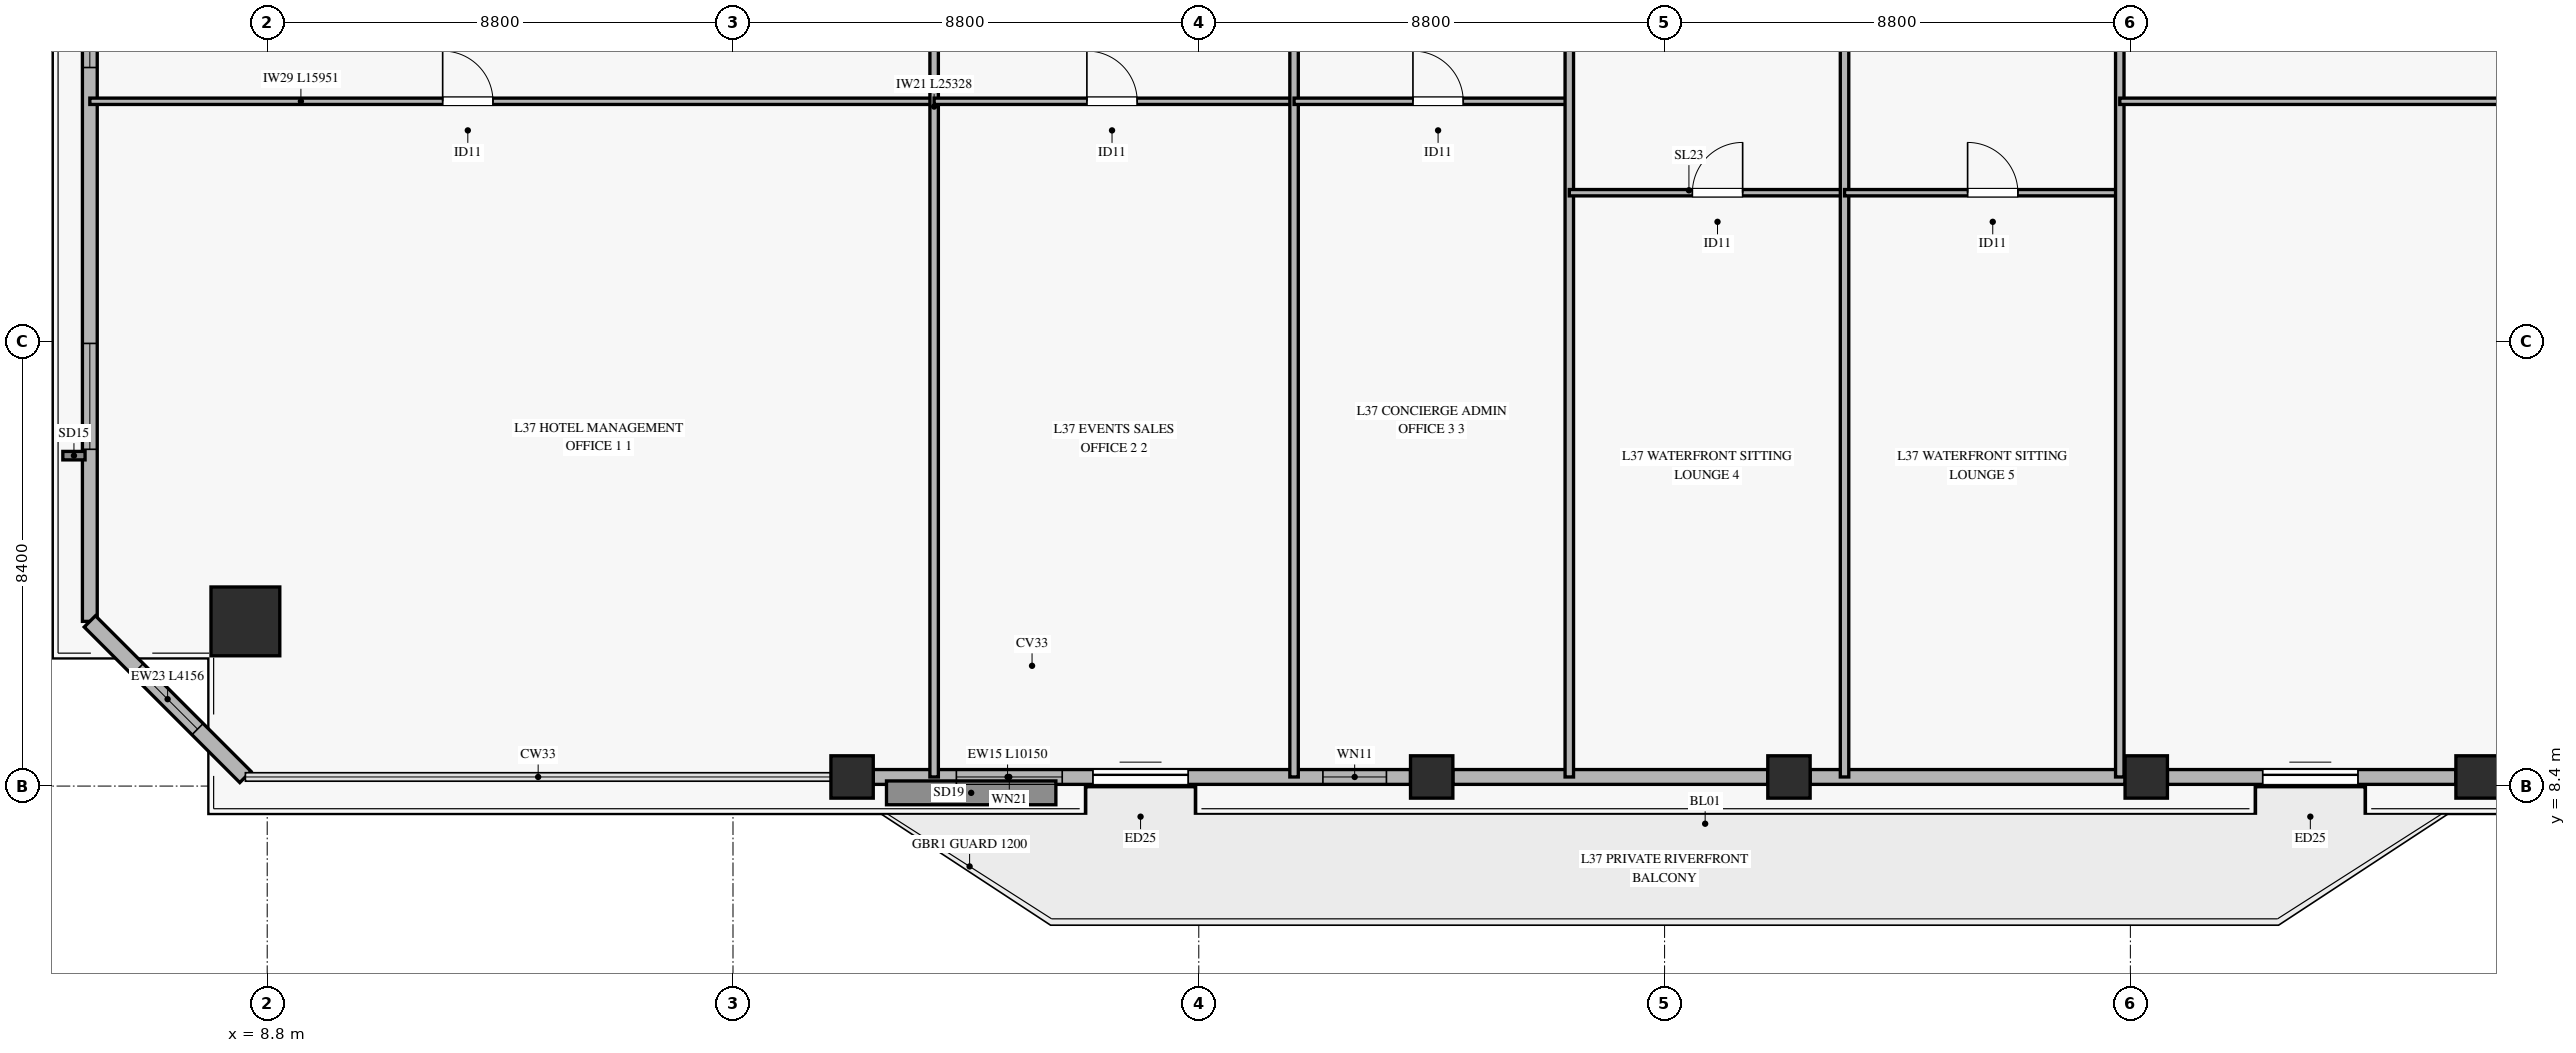
"""IFC4 building model, lengths in metres.
Left out: names, types, materials, properties, quantities, classifications, styles, units other than length and angle.
Written with IfcOpenShell. Run it as: python <this file> out.ifc"""

import sys

from ifc_helpers import new_model, si_unit, direction, frame, frame_2d, origin, origin_2d, place, context, subcontext, project, spatial, rectangle, hollow_rectangle, extrude, source, transform, mapped, element, fill, save


model = new_model("IFC4")
c1 = context("Model", 3, precision=1e-05, world=origin(), true_north=direction((0.0, 1.0)))
c2 = subcontext(c1, "Body", "Model", "MODEL_VIEW")
j1 = project(units=[si_unit("LENGTHUNIT", "METRE"), si_unit("PLANEANGLEUNIT", "RADIAN")], contexts=[c1])
p1 = place(None, origin())
s1 = spatial("IfcSite", under=j1, at=p1, CompositionType="ELEMENT")
p2 = place(p1, origin())
s2 = spatial("IfcBuilding", under=s1, at=p2, CompositionType="ELEMENT")
p3 = place(p2, frame((0.0, 0.0, 152.7)))
s3 = spatial("IfcBuildingStorey", under=s2, at=p3, CompositionType="ELEMENT", Elevation=152.7)
m1 = source(origin(), c2, "Body", "SweptSolid", [
    extrude(hollow_rectangle(XDim=1.3, YDim=1.3, WallThickness=0.06, at=origin_2d()), origin(), (0.0, 0.0, 1.0), 3.27),
])
p4 = place(p3, frame((8.388, 11.511, 0.0), z_axis=(0.0, 0.0, 1.0), x_axis=(1.0, 0.0, 0.0)))
e1 = element("IfcColumn", 1, at=p4, inside=s3, PredefinedType="COLUMN", context=c2, shape_type="MappedRepresentation", body=[
    mapped(m1, transform((0.0, 0.0, 0.0), x_axis=(1.0, 0.0, 0.0), y_axis=(0.0, 1.0, 0.0), z_axis=(0.0, 0.0, 1.0), scale=1.0)),
])
m2 = source(origin(), c2, "Body", "SweptSolid", [
    extrude(hollow_rectangle(XDim=0.8, YDim=0.8, WallThickness=0.036, at=origin_2d()), origin(), (0.0, 0.0, 1.0), 3.27),
])
for number, where, z_axis, x_axis in (
    (2, (19.85, 8.572, 0.0), (0.0, 0.0, 1.0), (1.0, 0.0, 0.0)),
    (3, (30.8, 8.572, 0.0), (0.0, 0.0, 1.0), (1.0, 0.0, 0.0)),
    (4, (37.55, 8.572, 0.0), (0.0, 0.0, 1.0), (1.0, 0.0, 0.0)),
    (5, (44.3, 8.572, 0.0), (0.0, 0.0, 1.0), (1.0, 0.0, 0.0)),
    (6, (50.55, 8.572, 0.0), (0.0, 0.0, 1.0), (1.0, 0.0, 0.0)),
):
    element("IfcColumn", number, at=place(p3, frame(where, z_axis=z_axis, x_axis=x_axis)), inside=s3, PredefinedType="COLUMN", context=c2, shape_type="MappedRepresentation", body=[
        mapped(m2, transform((0.0, 0.0, 0.0), x_axis=(1.0, 0.0, 0.0), y_axis=(0.0, 1.0, 0.0), z_axis=(0.0, 0.0, 1.0), scale=1.0)),
    ])
p5 = place(p3, frame((20.25, 8.572, 0.0), z_axis=(0.0, 0.0, 1.0), x_axis=(1.0, 0.0, 0.0)))
e7 = element("IfcWall", 7, at=p5, inside=s3, PredefinedType="SOLIDWALL", context=c2, shape_type="SweptSolid", body=[
    extrude(rectangle(XDim=10.15, YDim=0.28, at=frame_2d((5.075, 0.0))), origin(), (0.0, 0.0, 1.0), 2.75),
])
p6 = place(p5, frame((4.15, 0.0, 0.0)))
e8 = element("IfcOpeningElement", 8, at=p6, cuts=e7, PredefinedType="OPENING", context=c2, shape_type="SweptSolid", body=[
    extrude(rectangle(XDim=1.8, YDim=2.25, at=frame_2d((0.9, 1.125))), frame((0.0, 0.15, 0.0), z_axis=(0.0, -1.0, 0.0), x_axis=(1.0, 0.0, 0.0)), (0.0, 0.0, 1.0), 0.3),
])
p7 = place(p5, frame((1.57, 0.0, 0.45)))
e9 = element("IfcOpeningElement", 9, at=p7, cuts=e7, PredefinedType="OPENING", context=c2, shape_type="SweptSolid", body=[
    extrude(rectangle(XDim=2.0, YDim=2.0, at=frame_2d((1.0, 1.0))), frame((0.0, 0.15, 0.0), z_axis=(0.0, -1.0, 0.0), x_axis=(1.0, 0.0, 0.0)), (0.0, 0.0, 1.0), 0.3),
])
p8 = place(p5, frame((8.495, 0.0, 0.45)))
e10 = element("IfcOpeningElement", 10, at=p8, cuts=e7, PredefinedType="OPENING", context=c2, shape_type="SweptSolid", body=[
    extrude(rectangle(XDim=1.2, YDim=2.0, at=frame_2d((0.6, 1.0))), frame((0.0, 0.15, 0.0), z_axis=(0.0, -1.0, 0.0), x_axis=(1.0, 0.0, 0.0)), (0.0, 0.0, 1.0), 0.3),
])
for number, where, z_axis, x_axis in (
    (11, (31.2, 8.572, 0.0), (0.0, 0.0, 1.0), (1.0, 0.0, 0.0)),
    (12, (37.95, 8.572, 0.0), (0.0, 0.0, 1.0), (1.0, 0.0, 0.0)),
):
    element("IfcWall", number, at=place(p3, frame(where, z_axis=z_axis, x_axis=x_axis)), inside=s3, PredefinedType="SOLIDWALL", context=c2, shape_type="SweptSolid", body=[
        extrude(rectangle(XDim=5.95, YDim=0.28, at=frame_2d((2.975, 0.0))), origin(), (0.0, 0.0, 1.0), 2.75),
    ])
p9 = place(p3, frame((44.7, 8.572, 0.0), z_axis=(0.0, 0.0, 1.0), x_axis=(1.0, 0.0, 0.0)))
e13 = element("IfcWall", 13, at=p9, inside=s3, PredefinedType="SOLIDWALL", context=c2, shape_type="SweptSolid", body=[
    extrude(rectangle(XDim=5.45, YDim=0.28, at=frame_2d((2.725, 0.0))), origin(), (0.0, 0.0, 1.0), 2.75),
])
p10 = place(p9, frame((1.8, 0.0, 0.0)))
e14 = element("IfcOpeningElement", 14, at=p10, cuts=e13, PredefinedType="OPENING", context=c2, shape_type="SweptSolid", body=[
    extrude(rectangle(XDim=1.8, YDim=2.25, at=frame_2d((0.9, 1.125))), frame((0.0, 0.15, 0.0), z_axis=(0.0, -1.0, 0.0), x_axis=(1.0, 0.0, 0.0)), (0.0, 0.0, 1.0), 0.3),
])
p11 = place(p3, frame((5.449, 11.511, 0.0), z_axis=(0.0, 0.0, 1.0), x_axis=(0.0, 1.0, 0.0)))
e15 = element("IfcWall", 15, at=p11, inside=s3, PredefinedType="SOLIDWALL", context=c2, shape_type="SweptSolid", body=[
    extrude(rectangle(XDim=15.425, YDim=0.28, at=frame_2d((7.712, 0.0))), origin(), (0.0, 0.0, 1.0), 2.75),
])
p12 = place(p11, frame((3.251, 0.0, 0.45)))
e16 = element("IfcOpeningElement", 16, at=p12, cuts=e15, PredefinedType="OPENING", context=c2, shape_type="SweptSolid", body=[
    extrude(rectangle(XDim=2.0, YDim=2.0, at=frame_2d((1.0, 1.0))), frame((0.0, 0.15, 0.0), z_axis=(0.0, -1.0, 0.0), x_axis=(1.0, 0.0, 0.0)), (0.0, 0.0, 1.0), 0.3),
])
p13 = place(p11, frame((10.463, 0.0, 0.45)))
e17 = element("IfcOpeningElement", 17, at=p13, cuts=e15, PredefinedType="OPENING", context=c2, shape_type="SweptSolid", body=[
    extrude(rectangle(XDim=2.0, YDim=2.0, at=frame_2d((1.0, 1.0))), frame((0.0, 0.15, 0.0), z_axis=(0.0, -1.0, 0.0), x_axis=(1.0, 0.0, 0.0)), (0.0, 0.0, 1.0), 0.3),
])
p14 = place(p3, frame((5.449, 11.511, 0.0), z_axis=(0.0, 0.0, 1.0), x_axis=(0.707106781187, -0.707106781187, 0.0)))
e18 = element("IfcWall", 18, at=p14, inside=s3, PredefinedType="SOLIDWALL", context=c2, shape_type="SweptSolid", body=[
    extrude(rectangle(XDim=4.156, YDim=0.3, at=frame_2d((2.078, 0.0))), origin(), (0.0, 0.0, 1.0), 2.75),
])
p15 = place(p14, frame((1.278, 0.0, 0.45)))
e19 = element("IfcOpeningElement", 19, at=p15, cuts=e18, PredefinedType="OPENING", context=c2, shape_type="SweptSolid", body=[
    extrude(rectangle(XDim=1.6, YDim=2.0, at=frame_2d((0.8, 1.0))), frame((0.0, 0.16, 0.0), z_axis=(0.0, -1.0, 0.0), x_axis=(1.0, 0.0, 0.0)), (0.0, 0.0, 1.0), 0.32),
])
p16 = place(p3, frame((5.449, 21.336, 0.0), z_axis=(0.0, 0.0, 1.0), x_axis=(1.0, 0.0, 0.0)))
e20 = element("IfcWall", 20, at=p16, inside=s3, PredefinedType="PARTITIONING", context=c2, shape_type="SweptSolid", body=[
    extrude(rectangle(XDim=15.951, YDim=0.12, at=frame_2d((7.976, 0.0))), origin(), (0.0, 0.0, 1.0), 2.455),
])
p17 = place(p16, frame((6.666, 0.0, 0.0)))
e21 = element("IfcOpeningElement", 21, at=p17, cuts=e20, PredefinedType="OPENING", context=c2, shape_type="SweptSolid", body=[
    extrude(rectangle(XDim=0.95, YDim=2.1, at=frame_2d((0.475, 1.05))), frame((0.0, 0.07, 0.0), z_axis=(0.0, -1.0, 0.0), x_axis=(1.0, 0.0, 0.0)), (0.0, 0.0, 1.0), 0.14),
])
p18 = place(p3, frame((21.4, 8.572, 0.0), z_axis=(0.0, 0.0, 1.0), x_axis=(0.0, 1.0, 0.0)))
e22 = element("IfcWall", 22, at=p18, inside=s3, PredefinedType="PARTITIONING", context=c2, shape_type="SweptSolid", body=[
    extrude(rectangle(XDim=25.328, YDim=0.16, at=frame_2d((12.664, 0.0))), origin(), (0.0, 0.0, 1.0), 2.755),
])
p19 = place(p3, frame((21.4, 21.336, 0.0), z_axis=(0.0, 0.0, 1.0), x_axis=(1.0, 0.0, 0.0)))
e23 = element("IfcWall", 23, at=p19, inside=s3, PredefinedType="PARTITIONING", context=c2, shape_type="SweptSolid", body=[
    extrude(rectangle(XDim=6.8, YDim=0.12, at=frame_2d((3.4, 0.0))), origin(), (0.0, 0.0, 1.0), 3.27),
])
p20 = place(p19, frame((2.886, 0.0, 0.0)))
e24 = element("IfcOpeningElement", 24, at=p20, cuts=e23, PredefinedType="OPENING", context=c2, shape_type="SweptSolid", body=[
    extrude(rectangle(XDim=0.95, YDim=2.1, at=frame_2d((0.475, 1.05))), frame((0.0, 0.07, 0.0), z_axis=(0.0, -1.0, 0.0), x_axis=(1.0, 0.0, 0.0)), (0.0, 0.0, 1.0), 0.14),
])
p21 = place(p3, frame((28.2, 8.572, 0.0), z_axis=(0.0, 0.0, 1.0), x_axis=(0.0, 1.0, 0.0)))
e25 = element("IfcWall", 25, at=p21, inside=s3, PredefinedType="PARTITIONING", context=c2, shape_type="SweptSolid", body=[
    extrude(rectangle(XDim=25.328, YDim=0.16, at=frame_2d((12.664, 0.0))), origin(), (0.0, 0.0, 1.0), 2.755),
])
p22 = place(p3, frame((28.2, 21.336, 0.0), z_axis=(0.0, 0.0, 1.0), x_axis=(1.0, 0.0, 0.0)))
e26 = element("IfcWall", 26, at=p22, inside=s3, PredefinedType="PARTITIONING", context=c2, shape_type="SweptSolid", body=[
    extrude(rectangle(XDim=5.2, YDim=0.12, at=frame_2d((2.6, 0.0))), origin(), (0.0, 0.0, 1.0), 2.455),
])
p23 = place(p22, frame((2.246, 0.0, 0.0)))
e27 = element("IfcOpeningElement", 27, at=p23, cuts=e26, PredefinedType="OPENING", context=c2, shape_type="SweptSolid", body=[
    extrude(rectangle(XDim=0.95, YDim=2.1, at=frame_2d((0.475, 1.05))), frame((0.0, 0.07, 0.0), z_axis=(0.0, -1.0, 0.0), x_axis=(1.0, 0.0, 0.0)), (0.0, 0.0, 1.0), 0.14),
])
p24 = place(p3, frame((33.4, 8.572, 0.0), z_axis=(0.0, 0.0, 1.0), x_axis=(0.0, 1.0, 0.0)))
e28 = element("IfcWall", 28, at=p24, inside=s3, PredefinedType="PARTITIONING", context=c2, shape_type="SweptSolid", body=[
    extrude(rectangle(XDim=25.328, YDim=0.16, at=frame_2d((12.664, 0.0))), origin(), (0.0, 0.0, 1.0), 2.755),
])
p25 = place(p3, frame((33.4, 19.609, 0.0), z_axis=(0.0, 0.0, 1.0), x_axis=(1.0, 0.0, 0.0)))
e29 = element("IfcWall", 29, at=p25, inside=s3, PredefinedType="PARTITIONING", context=c2, shape_type="SweptSolid", body=[
    extrude(rectangle(XDim=5.2, YDim=0.12, at=frame_2d((2.6, 0.0))), origin(), (0.0, 0.0, 1.0), 2.455),
])
p26 = place(p25, frame((2.325, 0.0, 0.0)))
e30 = element("IfcOpeningElement", 30, at=p26, cuts=e29, PredefinedType="OPENING", context=c2, shape_type="SweptSolid", body=[
    extrude(rectangle(XDim=0.95, YDim=2.1, at=frame_2d((0.475, 1.05))), frame((0.0, 0.07, 0.0), z_axis=(0.0, -1.0, 0.0), x_axis=(1.0, 0.0, 0.0)), (0.0, 0.0, 1.0), 0.14),
])
p27 = place(p3, frame((38.6, 8.572, 0.0), z_axis=(0.0, 0.0, 1.0), x_axis=(0.0, 1.0, 0.0)))
e31 = element("IfcWall", 31, at=p27, inside=s3, PredefinedType="PARTITIONING", context=c2, shape_type="SweptSolid", body=[
    extrude(rectangle(XDim=25.328, YDim=0.16, at=frame_2d((12.664, 0.0))), origin(), (0.0, 0.0, 1.0), 2.755),
])
p28 = place(p3, frame((38.6, 19.609, 0.0), z_axis=(0.0, 0.0, 1.0), x_axis=(1.0, 0.0, 0.0)))
e32 = element("IfcWall", 32, at=p28, inside=s3, PredefinedType="PARTITIONING", context=c2, shape_type="SweptSolid", body=[
    extrude(rectangle(XDim=5.2, YDim=0.12, at=frame_2d((2.6, 0.0))), origin(), (0.0, 0.0, 1.0), 3.27),
])
p29 = place(p28, frame((2.325, 0.0, 0.0)))
e33 = element("IfcOpeningElement", 33, at=p29, cuts=e32, PredefinedType="OPENING", context=c2, shape_type="SweptSolid", body=[
    extrude(rectangle(XDim=0.95, YDim=2.1, at=frame_2d((0.475, 1.05))), frame((0.0, 0.07, 0.0), z_axis=(0.0, -1.0, 0.0), x_axis=(1.0, 0.0, 0.0)), (0.0, 0.0, 1.0), 0.14),
])
p30 = place(p3, frame((43.8, 8.572, 0.0), z_axis=(0.0, 0.0, 1.0), x_axis=(0.0, 1.0, 0.0)))
e34 = element("IfcWall", 34, at=p30, inside=s3, PredefinedType="PARTITIONING", context=c2, shape_type="SweptSolid", body=[
    extrude(rectangle(XDim=25.328, YDim=0.16, at=frame_2d((12.664, 0.0))), origin(), (0.0, 0.0, 1.0), 2.755),
])
p31 = place(p3, frame((43.8, 21.336, 0.0), z_axis=(0.0, 0.0, 1.0), x_axis=(1.0, 0.0, 0.0)))
e35 = element("IfcWall", 35, at=p31, inside=s3, PredefinedType="PARTITIONING", context=c2, shape_type="SweptSolid", body=[
    extrude(rectangle(XDim=21.151, YDim=0.12, at=frame_2d((10.575, 0.0))), origin(), (0.0, 0.0, 1.0), 2.455),
])
p32 = place(p31, frame((8.546, 0.0, 0.0)))
e36 = element("IfcOpeningElement", 36, at=p32, cuts=e35, PredefinedType="OPENING", context=c2, shape_type="SweptSolid", body=[
    extrude(rectangle(XDim=0.95, YDim=2.1, at=frame_2d((0.475, 1.05))), frame((0.0, 0.07, 0.0), z_axis=(0.0, -1.0, 0.0), x_axis=(1.0, 0.0, 0.0)), (0.0, 0.0, 1.0), 0.14),
])
m3 = source(origin(), c2, "Body", "SweptSolid", [
    extrude(rectangle(XDim=1.8, YDim=2.25, at=frame_2d((0.9, 1.125))), frame((0.0, 0.025, 0.0), z_axis=(0.0, -1.0, 0.0), x_axis=(1.0, 0.0, 0.0)), (0.0, 0.0, 1.0), 0.05),
])
p33 = place(p6, origin())
e37 = element("IfcDoor", 37, at=p33, inside=s3, OperationType="SLIDING_TO_LEFT", PredefinedType="DOOR", context=c2, shape_type="MappedRepresentation", body=[
    mapped(m3, transform((0.0, 0.0, 0.0), x_axis=(1.0, 0.0, 0.0), y_axis=(0.0, 1.0, 0.0), z_axis=(0.0, 0.0, 1.0), scale=1.0)),
])
fill(e8, e37)
m4 = source(origin(), c2, "Body", "SweptSolid", [
    extrude(rectangle(XDim=2.0, YDim=2.0, at=frame_2d((1.0, 1.0))), frame((0.0, 0.03, 0.0), z_axis=(0.0, -1.0, 0.0), x_axis=(1.0, 0.0, 0.0)), (0.0, 0.0, 1.0), 0.06),
])
p34 = place(p7, origin())
e38 = element("IfcWindow", 38, at=p34, inside=s3, PartitioningType="SINGLE_PANEL", PredefinedType="WINDOW", context=c2, shape_type="MappedRepresentation", body=[
    mapped(m4, transform((0.0, 0.0, 0.0), x_axis=(1.0, 0.0, 0.0), y_axis=(0.0, 1.0, 0.0), z_axis=(0.0, 0.0, 1.0), scale=1.0)),
])
fill(e9, e38)
m5 = source(origin(), c2, "Body", "SweptSolid", [
    extrude(rectangle(XDim=1.2, YDim=2.0, at=frame_2d((0.6, 1.0))), frame((0.0, 0.03, 0.0), z_axis=(0.0, -1.0, 0.0), x_axis=(1.0, 0.0, 0.0)), (0.0, 0.0, 1.0), 0.06),
])
p35 = place(p8, origin())
e39 = element("IfcWindow", 39, at=p35, inside=s3, PartitioningType="SINGLE_PANEL", PredefinedType="WINDOW", context=c2, shape_type="MappedRepresentation", body=[
    mapped(m5, transform((0.0, 0.0, 0.0), x_axis=(1.0, 0.0, 0.0), y_axis=(0.0, 1.0, 0.0), z_axis=(0.0, 0.0, 1.0), scale=1.0)),
])
fill(e10, e39)
p36 = place(p10, origin())
e40 = element("IfcDoor", 40, at=p36, inside=s3, OperationType="SLIDING_TO_LEFT", PredefinedType="DOOR", context=c2, shape_type="MappedRepresentation", body=[
    mapped(m3, transform((0.0, 0.0, 0.0), x_axis=(1.0, 0.0, 0.0), y_axis=(0.0, 1.0, 0.0), z_axis=(0.0, 0.0, 1.0), scale=1.0)),
])
fill(e14, e40)
p37 = place(p12, origin())
e41 = element("IfcWindow", 41, at=p37, inside=s3, PartitioningType="SINGLE_PANEL", PredefinedType="WINDOW", context=c2, shape_type="MappedRepresentation", body=[
    mapped(m4, transform((0.0, 0.0, 0.0), x_axis=(1.0, 0.0, 0.0), y_axis=(0.0, 1.0, 0.0), z_axis=(0.0, 0.0, 1.0), scale=1.0)),
])
fill(e16, e41)
p38 = place(p13, origin())
e42 = element("IfcWindow", 42, at=p38, inside=s3, PartitioningType="SINGLE_PANEL", PredefinedType="WINDOW", context=c2, shape_type="MappedRepresentation", body=[
    mapped(m4, transform((0.0, 0.0, 0.0), x_axis=(1.0, 0.0, 0.0), y_axis=(0.0, 1.0, 0.0), z_axis=(0.0, 0.0, 1.0), scale=1.0)),
])
fill(e17, e42)
m6 = source(origin(), c2, "Body", "SweptSolid", [
    extrude(rectangle(XDim=1.6, YDim=2.0, at=frame_2d((0.8, 1.0))), frame((0.0, 0.03, 0.0), z_axis=(0.0, -1.0, 0.0), x_axis=(1.0, 0.0, 0.0)), (0.0, 0.0, 1.0), 0.06),
])
p39 = place(p15, origin())
e43 = element("IfcWindow", 43, at=p39, inside=s3, PartitioningType="SINGLE_PANEL", PredefinedType="WINDOW", context=c2, shape_type="MappedRepresentation", body=[
    mapped(m6, transform((0.0, 0.0, 0.0), x_axis=(1.0, 0.0, 0.0), y_axis=(0.0, 1.0, 0.0), z_axis=(0.0, 0.0, 1.0), scale=1.0)),
])
fill(e19, e43)
m7 = source(origin(), c2, "Body", "SweptSolid", [
    extrude(rectangle(XDim=0.95, YDim=2.1, at=frame_2d((0.475, 1.05))), frame((0.0, 0.025, 0.0), z_axis=(0.0, -1.0, 0.0), x_axis=(1.0, 0.0, 0.0)), (0.0, 0.0, 1.0), 0.05),
])
p40 = place(p17, origin())
e44 = element("IfcDoor", 44, at=p40, inside=s3, OperationType="SINGLE_SWING_LEFT", PredefinedType="DOOR", context=c2, shape_type="MappedRepresentation", body=[
    mapped(m7, transform((0.0, 0.0, 0.0), x_axis=(1.0, 0.0, 0.0), y_axis=(0.0, 1.0, 0.0), z_axis=(0.0, 0.0, 1.0), scale=1.0)),
])
fill(e21, e44)
p41 = place(p20, origin())
e45 = element("IfcDoor", 45, at=p41, inside=s3, OperationType="SINGLE_SWING_LEFT", PredefinedType="DOOR", context=c2, shape_type="MappedRepresentation", body=[
    mapped(m7, transform((0.0, 0.0, 0.0), x_axis=(1.0, 0.0, 0.0), y_axis=(0.0, 1.0, 0.0), z_axis=(0.0, 0.0, 1.0), scale=1.0)),
])
fill(e24, e45)
p42 = place(p23, origin())
e46 = element("IfcDoor", 46, at=p42, inside=s3, OperationType="SINGLE_SWING_LEFT", PredefinedType="DOOR", context=c2, shape_type="MappedRepresentation", body=[
    mapped(m7, transform((0.0, 0.0, 0.0), x_axis=(1.0, 0.0, 0.0), y_axis=(0.0, 1.0, 0.0), z_axis=(0.0, 0.0, 1.0), scale=1.0)),
])
fill(e27, e46)
p43 = place(p26, origin())
e47 = element("IfcDoor", 47, at=p43, inside=s3, OperationType="SINGLE_SWING_RIGHT", PredefinedType="DOOR", context=c2, shape_type="MappedRepresentation", body=[
    mapped(m7, transform((0.0, 0.0, 0.0), x_axis=(1.0, 0.0, 0.0), y_axis=(0.0, 1.0, 0.0), z_axis=(0.0, 0.0, 1.0), scale=1.0)),
])
fill(e30, e47)
p44 = place(p29, origin())
e48 = element("IfcDoor", 48, at=p44, inside=s3, OperationType="SINGLE_SWING_LEFT", PredefinedType="DOOR", context=c2, shape_type="MappedRepresentation", body=[
    mapped(m7, transform((0.0, 0.0, 0.0), x_axis=(1.0, 0.0, 0.0), y_axis=(0.0, 1.0, 0.0), z_axis=(0.0, 0.0, 1.0), scale=1.0)),
])
fill(e33, e48)
save(model, sys.argv[1])
